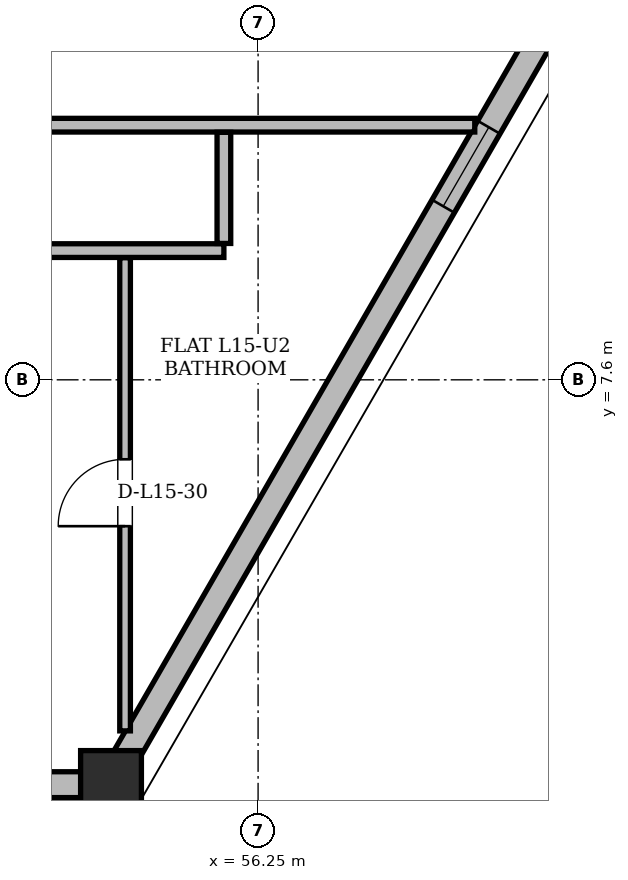
"""IFC4 building model, lengths in metres.
Left out: names, types, materials, properties, quantities, classifications, styles, units other than length and angle.
Written with IfcOpenShell. Run it as: python <this file> out.ifc"""

import sys

from ifc_helpers import new_model, si_unit, direction, frame, frame_2d, origin, origin_2d, place, context, subcontext, project, spatial, rectangle, hollow_rectangle, extrude, element, fill, save


model = new_model("IFC4")
c1 = context("Model", 3, precision=1e-05, world=origin(), true_north=direction((0.0, 1.0)))
c2 = subcontext(c1, "Body", "Model", "MODEL_VIEW")
j1 = project(units=[si_unit("LENGTHUNIT", "METRE"), si_unit("PLANEANGLEUNIT", "RADIAN")], contexts=[c1])
p1 = place(None, origin())
s1 = spatial("IfcSite", under=j1, at=p1, CompositionType="ELEMENT")
p2 = place(p1, origin())
s2 = spatial("IfcBuilding", under=s1, at=p2, CompositionType="ELEMENT")
p3 = place(p2, frame((0.0, 0.0, 59.7)))
s3 = spatial("IfcBuildingStorey", under=s2, at=p3, CompositionType="ELEMENT", Elevation=59.7)
p4 = place(p3, frame((54.292, 2.274, 0.005), z_axis=(0.012504688845, 0.026912265122, 0.999559584388), x_axis=(-0.906883968977, 0.42138043003, 0.0)))
e1 = element("IfcColumn", 1, at=p4, inside=s3, PredefinedType="COLUMN", context=c2, shape_type="SweptSolid", body=[
    extrude(hollow_rectangle(XDim=0.8, YDim=0.8, WallThickness=0.065, at=origin_2d()), origin(), (0.0, 0.0, 1.0), 3.592),
])
p5 = place(p3, frame((20.708, 2.274, 0.0), z_axis=(0.0, 0.0, 1.0), x_axis=(1.0, 0.0, 0.0)))
e2 = element("IfcWall", 2, at=p5, inside=s3, PredefinedType="SOLIDWALL", context=c2, shape_type="SweptSolid", body=[
    extrude(rectangle(XDim=33.585, YDim=0.34, at=frame_2d((16.792, 0.0))), origin(), (0.0, 0.0, 1.0), 2.494),
])
p6 = place(p5, frame((7.824, 0.0, 0.0)))
e3 = element("IfcOpeningElement", 3, at=p6, cuts=e2, PredefinedType="OPENING", context=c2, shape_type="SweptSolid", body=[
    extrude(rectangle(XDim=1.5, YDim=2.2, at=frame_2d((0.75, 1.1))), frame((0.0, 0.17, 0.0), z_axis=(0.0, -1.0, 0.0), x_axis=(1.0, 0.0, 0.0)), (0.0, 0.0, 1.0), 0.34),
])
p7 = place(p5, frame((25.925, 0.0, 0.0)))
e4 = element("IfcOpeningElement", 4, at=p7, cuts=e2, PredefinedType="OPENING", context=c2, shape_type="SweptSolid", body=[
    extrude(rectangle(XDim=1.5, YDim=2.2, at=frame_2d((0.75, 1.1))), frame((0.0, 0.17, 0.0), z_axis=(0.0, -1.0, 0.0), x_axis=(1.0, 0.0, 0.0)), (0.0, 0.0, 1.0), 0.34),
])
p8 = place(p5, frame((11.312, 0.0, 0.85)))
e5 = element("IfcOpeningElement", 5, at=p8, cuts=e2, PredefinedType="OPENING", context=c2, shape_type="SweptSolid", body=[
    extrude(rectangle(XDim=2.0, YDim=1.534, at=frame_2d((1.0, 0.767))), frame((0.0, 0.17, 0.0), z_axis=(0.0, -1.0, 0.0), x_axis=(1.0, 0.0, 0.0)), (0.0, 0.0, 1.0), 0.34),
])
p9 = place(p5, frame((19.034, 0.0, 0.85)))
e6 = element("IfcOpeningElement", 6, at=p9, cuts=e2, PredefinedType="OPENING", context=c2, shape_type="SweptSolid", body=[
    extrude(rectangle(XDim=1.4, YDim=1.534, at=frame_2d((0.7, 0.767))), frame((0.0, 0.17, 0.0), z_axis=(0.0, -1.0, 0.0), x_axis=(1.0, 0.0, 0.0)), (0.0, 0.0, 1.0), 0.34),
])
p10 = place(p5, frame((24.458, 0.0, 0.85)))
e7 = element("IfcOpeningElement", 7, at=p10, cuts=e2, PredefinedType="OPENING", context=c2, shape_type="SweptSolid", body=[
    extrude(rectangle(XDim=1.2, YDim=1.48, at=frame_2d((0.6, 0.74))), frame((0.0, 0.17, 0.0), z_axis=(0.0, -1.0, 0.0), x_axis=(1.0, 0.0, 0.0)), (0.0, 0.0, 1.0), 0.34),
])
p11 = place(p5, frame((29.361, 0.0, 0.85)))
e8 = element("IfcOpeningElement", 8, at=p11, cuts=e2, PredefinedType="OPENING", context=c2, shape_type="SweptSolid", body=[
    extrude(rectangle(XDim=3.0, YDim=1.534, at=frame_2d((1.5, 0.767))), frame((0.0, 0.17, 0.0), z_axis=(0.0, -1.0, 0.0), x_axis=(1.0, 0.0, 0.0)), (0.0, 0.0, 1.0), 0.34),
])
p12 = place(p5, frame((0.971, 0.0, 0.85)))
e9 = element("IfcOpeningElement", 9, at=p12, cuts=e2, PredefinedType="OPENING", context=c2, shape_type="SweptSolid", body=[
    extrude(rectangle(XDim=1.2, YDim=1.48, at=frame_2d((0.6, 0.74))), frame((0.0, 0.17, 0.0), z_axis=(0.0, -1.0, 0.0), x_axis=(1.0, 0.0, 0.0)), (0.0, 0.0, 1.0), 0.34),
])
p13 = place(p5, frame((3.327, 0.0, 0.85)))
e10 = element("IfcOpeningElement", 10, at=p13, cuts=e2, PredefinedType="OPENING", context=c2, shape_type="SweptSolid", body=[
    extrude(rectangle(XDim=1.2, YDim=1.48, at=frame_2d((0.6, 0.74))), frame((0.0, 0.17, 0.0), z_axis=(0.0, -1.0, 0.0), x_axis=(1.0, 0.0, 0.0)), (0.0, 0.0, 1.0), 0.34),
])
p14 = place(p3, frame((54.292, 2.274, 0.0), z_axis=(0.0, 0.0, 1.0), x_axis=(0.499996557917, 0.866027391063, 0.0)))
e11 = element("IfcWall", 11, at=p14, inside=s3, PredefinedType="SOLIDWALL", context=c2, shape_type="SweptSolid", body=[
    extrude(rectangle(XDim=14.083, YDim=0.34, at=frame_2d((7.042, 0.0))), origin(), (0.0, 0.0, 1.0), 2.494),
])
p15 = place(p14, frame((8.787, 0.0, 0.85)))
e12 = element("IfcOpeningElement", 12, at=p15, cuts=e11, PredefinedType="OPENING", context=c2, shape_type="SweptSolid", body=[
    extrude(rectangle(XDim=1.2, YDim=1.48, at=frame_2d((0.6, 0.74))), frame((0.0, 0.17, 0.0), z_axis=(0.0, -1.0, 0.0), x_axis=(1.0, 0.0, 0.0)), (0.0, 0.0, 1.0), 0.34),
])
p16 = place(p3, frame((19.2, 9.3, 0.0), z_axis=(0.0, 0.0, 1.0), x_axis=(1.0, 0.0, 0.0)))
e13 = element("IfcWall", 13, at=p16, inside=s3, PredefinedType="PARTITIONING", context=c2, shape_type="SweptSolid", body=[
    extrude(rectangle(XDim=36.6, YDim=0.18, at=frame_2d((18.3, 0.0))), origin(), (0.0, 0.0, 1.0), 2.738),
])
p17 = place(p16, frame((3.844, 0.0, 0.0)))
e14 = element("IfcOpeningElement", 14, at=p17, cuts=e13, PredefinedType="OPENING", context=c2, shape_type="SweptSolid", body=[
    extrude(rectangle(XDim=1.0, YDim=2.18, at=frame_2d((0.5, 1.09))), frame((0.0, 0.09, 0.0), z_axis=(0.0, -1.0, 0.0), x_axis=(1.0, 0.0, 0.0)), (0.0, 0.0, 1.0), 0.18),
])
p18 = place(p16, frame((17.699, 0.0, 0.0)))
e15 = element("IfcOpeningElement", 15, at=p18, cuts=e13, PredefinedType="OPENING", context=c2, shape_type="SweptSolid", body=[
    extrude(rectangle(XDim=1.0, YDim=2.18, at=frame_2d((0.5, 1.09))), frame((0.0, 0.09, 0.0), z_axis=(0.0, -1.0, 0.0), x_axis=(1.0, 0.0, 0.0)), (0.0, 0.0, 1.0), 0.18),
])
p19 = place(p16, frame((28.999, 0.0, 0.0)))
e16 = element("IfcOpeningElement", 16, at=p19, cuts=e13, PredefinedType="OPENING", context=c2, shape_type="SweptSolid", body=[
    extrude(rectangle(XDim=1.0, YDim=2.18, at=frame_2d((0.5, 1.09))), frame((0.0, 0.09, 0.0), z_axis=(0.0, -1.0, 0.0), x_axis=(1.0, 0.0, 0.0)), (0.0, 0.0, 1.0), 0.18),
])
p20 = place(p3, frame((47.45, 10.95, 0.0), z_axis=(0.0, 0.0, 1.0), x_axis=(1.0, 0.0, 0.0)))
e17 = element("IfcWall", 17, at=p20, inside=s3, PredefinedType="PARTITIONING", context=c2, shape_type="SweptSolid", body=[
    extrude(rectangle(XDim=11.651, YDim=0.18, at=frame_2d((5.825, 0.0))), origin(), (0.0, 0.0, 1.0), 3.36),
])
p21 = place(p3, frame((54.5, 2.981, 0.0), z_axis=(0.0, 0.0, 1.0), x_axis=(0.0, 1.0, 0.0)))
e18 = element("IfcWall", 18, at=p21, inside=s3, PredefinedType="PARTITIONING", context=c2, shape_type="SweptSolid", body=[
    extrude(rectangle(XDim=6.225, YDim=0.14, at=frame_2d((3.112, 0.0))), origin(), (0.0, 0.0, 1.0), 3.36),
])
p22 = place(p21, frame((2.693, 0.0, 0.0)))
e19 = element("IfcOpeningElement", 19, at=p22, cuts=e18, PredefinedType="OPENING", context=c2, shape_type="SweptSolid", body=[
    extrude(rectangle(XDim=0.88, YDim=2.08, at=frame_2d((0.44, 1.04))), frame((0.0, 0.07, 0.0), z_axis=(0.0, -1.0, 0.0), x_axis=(1.0, 0.0, 0.0)), (0.0, 0.0, 1.0), 0.14),
])
p23 = place(p3, frame((55.8, 9.394, 0.0), z_axis=(0.0, 0.0, 1.0), x_axis=(0.0, 1.0, 0.0)))
e20 = element("IfcWall", 20, at=p23, inside=s3, PredefinedType="PARTITIONING", context=c2, shape_type="SweptSolid", body=[
    extrude(rectangle(XDim=1.462, YDim=0.18, at=frame_2d((0.731, 0.0))), origin(), (0.0, 0.0, 1.0), 3.36),
])
p24 = place(p15, origin())
e21 = element("IfcWindow", 21, at=p24, inside=s3, PartitioningType="SINGLE_PANEL", PredefinedType="WINDOW", context=c2, shape_type="SweptSolid", body=[
    extrude(rectangle(XDim=1.2, YDim=1.48, at=frame_2d((0.6, 0.74))), frame((0.0, 0.03, 0.0), z_axis=(0.0, -1.0, 0.0), x_axis=(1.0, 0.0, 0.0)), (0.0, 0.0, 1.0), 0.06),
])
fill(e12, e21)
p25 = place(p22, origin())
e22 = element("IfcDoor", 22, at=p25, inside=s3, OperationType="SINGLE_SWING_LEFT", PredefinedType="DOOR", context=c2, shape_type="SweptSolid", body=[
    extrude(rectangle(XDim=0.88, YDim=2.08, at=frame_2d((0.44, 1.04))), frame((0.0, 0.025, 0.0), z_axis=(0.0, -1.0, 0.0), x_axis=(1.0, 0.0, 0.0)), (0.0, 0.0, 1.0), 0.05),
])
fill(e19, e22)
save(model, sys.argv[1])
